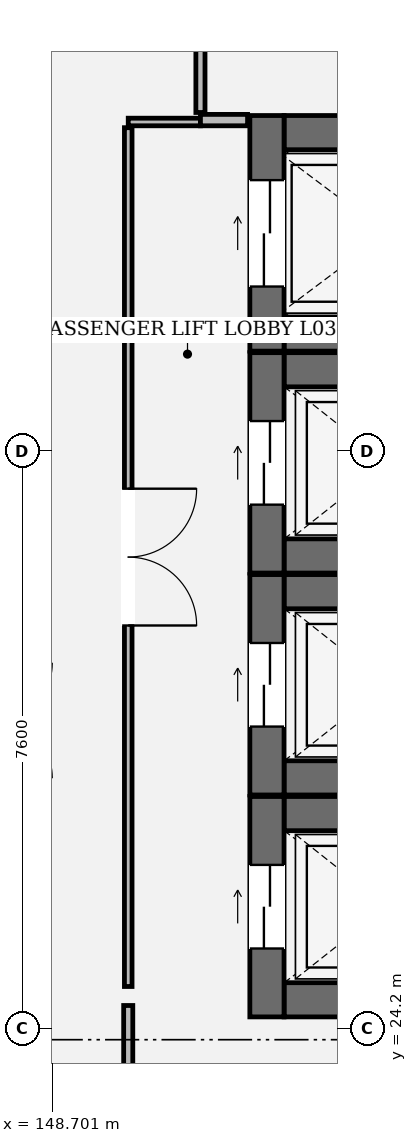
"""IFC4 building model, lengths in metres.
Left out: names, types, materials, properties, quantities, classifications, styles, units other than length and angle.
Written with IfcOpenShell. Run it as: python <this file> out.ifc"""

import sys

from ifc_helpers import new_model, si_unit, direction, frame, frame_2d, origin, place, context, subcontext, project, spatial, rectangle, extrude, element, fill, save


model = new_model("IFC4")
c1 = context("Model", 3, precision=1e-05, world=origin(), true_north=direction((0.0, 1.0)))
c2 = subcontext(c1, "Body", "Model", "MODEL_VIEW")
j1 = project(units=[si_unit("LENGTHUNIT", "METRE"), si_unit("PLANEANGLEUNIT", "RADIAN")], contexts=[c1])
p1 = place(None, origin())
s1 = spatial("IfcSite", under=j1, at=p1, CompositionType="ELEMENT")
p2 = place(p1, origin())
s2 = spatial("IfcBuilding", under=s1, at=p2, CompositionType="ELEMENT")
p3 = place(p2, frame((0.0, 0.0, 15.0)))
s3 = spatial("IfcBuildingStorey", under=s2, at=p3, CompositionType="ELEMENT", Elevation=15.0)
for number, where, z_axis, x_axis in (
    (1, (151.75, 24.575, 0.0), (0.0, 0.0, 1.0), (1.0, 0.0, 0.0)),
    (2, (151.75, 27.025, 0.0), (0.0, 0.0, 1.0), (1.0, 0.0, 0.0)),
):
    element("IfcWall", number, at=place(p3, frame(where, z_axis=z_axis, x_axis=x_axis)), inside=s3, PredefinedType="SHEAR", context=c2, shape_type="SweptSolid", body=[
        extrude(rectangle(XDim=2.7, YDim=0.45, at=frame_2d((1.35, 0.0))), origin(), (0.0, 0.0, 1.0), 4.48),
    ])
p4 = place(p3, frame((151.525, 24.35, 0.0), z_axis=(0.0, 0.0, 1.0), x_axis=(0.0, 1.0, 0.0)))
e3 = element("IfcWall", 3, at=p4, inside=s3, PredefinedType="SHEAR", context=c2, shape_type="SweptSolid", body=[
    extrude(rectangle(XDim=2.9, YDim=0.45, at=frame_2d((1.45, 0.0))), origin(), (0.0, 0.0, 1.0), 4.48),
])
p5 = place(p4, frame((0.9, 0.0, 0.0)))
e4 = element("IfcOpeningElement", 4, at=p5, cuts=e3, PredefinedType="OPENING", context=c2, shape_type="SweptSolid", body=[
    extrude(rectangle(XDim=1.1, YDim=2.2, at=frame_2d((0.55, 1.1))), frame((0.0, 0.237, 0.0), z_axis=(0.0, -1.0, 0.0), x_axis=(1.0, 0.0, 0.0)), (0.0, 0.0, 1.0), 0.474),
])
for number, where, z_axis, x_axis in (
    (5, (151.75, 27.495, 0.0), (0.0, 0.0, 1.0), (1.0, 0.0, 0.0)),
    (6, (151.75, 29.945, 0.0), (0.0, 0.0, 1.0), (1.0, 0.0, 0.0)),
):
    element("IfcWall", number, at=place(p3, frame(where, z_axis=z_axis, x_axis=x_axis)), inside=s3, PredefinedType="SHEAR", context=c2, shape_type="SweptSolid", body=[
        extrude(rectangle(XDim=2.7, YDim=0.45, at=frame_2d((1.35, 0.0))), origin(), (0.0, 0.0, 1.0), 4.48),
    ])
p6 = place(p3, frame((151.525, 27.27, 0.0), z_axis=(0.0, 0.0, 1.0), x_axis=(0.0, 1.0, 0.0)))
e7 = element("IfcWall", 7, at=p6, inside=s3, PredefinedType="SHEAR", context=c2, shape_type="SweptSolid", body=[
    extrude(rectangle(XDim=2.9, YDim=0.45, at=frame_2d((1.45, 0.0))), origin(), (0.0, 0.0, 1.0), 4.48),
])
p7 = place(p6, frame((0.9, 0.0, 0.0)))
e8 = element("IfcOpeningElement", 8, at=p7, cuts=e7, PredefinedType="OPENING", context=c2, shape_type="SweptSolid", body=[
    extrude(rectangle(XDim=1.1, YDim=2.2, at=frame_2d((0.55, 1.1))), frame((0.0, 0.237, 0.0), z_axis=(0.0, -1.0, 0.0), x_axis=(1.0, 0.0, 0.0)), (0.0, 0.0, 1.0), 0.474),
])
for number, where, z_axis, x_axis in (
    (9, (151.75, 30.415, 0.0), (0.0, 0.0, 1.0), (1.0, 0.0, 0.0)),
    (10, (151.75, 32.865, 0.0), (0.0, 0.0, 1.0), (1.0, 0.0, 0.0)),
):
    element("IfcWall", number, at=place(p3, frame(where, z_axis=z_axis, x_axis=x_axis)), inside=s3, PredefinedType="SHEAR", context=c2, shape_type="SweptSolid", body=[
        extrude(rectangle(XDim=2.7, YDim=0.45, at=frame_2d((1.35, 0.0))), origin(), (0.0, 0.0, 1.0), 4.48),
    ])
p8 = place(p3, frame((151.525, 30.19, 0.0), z_axis=(0.0, 0.0, 1.0), x_axis=(0.0, 1.0, 0.0)))
e11 = element("IfcWall", 11, at=p8, inside=s3, PredefinedType="SHEAR", context=c2, shape_type="SweptSolid", body=[
    extrude(rectangle(XDim=2.9, YDim=0.45, at=frame_2d((1.45, 0.0))), origin(), (0.0, 0.0, 1.0), 4.48),
])
p9 = place(p8, frame((0.9, 0.0, 0.0)))
e12 = element("IfcOpeningElement", 12, at=p9, cuts=e11, PredefinedType="OPENING", context=c2, shape_type="SweptSolid", body=[
    extrude(rectangle(XDim=1.1, YDim=2.2, at=frame_2d((0.55, 1.1))), frame((0.0, 0.237, 0.0), z_axis=(0.0, -1.0, 0.0), x_axis=(1.0, 0.0, 0.0)), (0.0, 0.0, 1.0), 0.474),
])
for number, where, z_axis, x_axis in (
    (13, (151.75, 33.335, 0.0), (0.0, 0.0, 1.0), (1.0, 0.0, 0.0)),
    (14, (151.75, 35.985, 0.0), (0.0, 0.0, 1.0), (1.0, 0.0, 0.0)),
):
    element("IfcWall", number, at=place(p3, frame(where, z_axis=z_axis, x_axis=x_axis)), inside=s3, PredefinedType="SHEAR", context=c2, shape_type="SweptSolid", body=[
        extrude(rectangle(XDim=2.7, YDim=0.45, at=frame_2d((1.35, 0.0))), origin(), (0.0, 0.0, 1.0), 4.48),
    ])
p10 = place(p3, frame((151.525, 33.11, 0.0), z_axis=(0.0, 0.0, 1.0), x_axis=(0.0, 1.0, 0.0)))
e15 = element("IfcWall", 15, at=p10, inside=s3, PredefinedType="SHEAR", context=c2, shape_type="SweptSolid", body=[
    extrude(rectangle(XDim=3.1, YDim=0.45, at=frame_2d((1.55, 0.0))), origin(), (0.0, 0.0, 1.0), 4.48),
])
p11 = place(p10, frame((0.85, 0.0, 0.0)))
e16 = element("IfcOpeningElement", 16, at=p11, cuts=e15, PredefinedType="OPENING", context=c2, shape_type="SweptSolid", body=[
    extrude(rectangle(XDim=1.4, YDim=2.3, at=frame_2d((0.7, 1.15))), frame((0.0, 0.237, 0.0), z_axis=(0.0, -1.0, 0.0), x_axis=(1.0, 0.0, 0.0)), (0.0, 0.0, 1.0), 0.474),
])
p12 = place(p3, frame((149.7, 24.75, 0.0), z_axis=(0.0, 0.0, 1.0), x_axis=(0.0, 1.0, 0.0)))
e17 = element("IfcWall", 17, at=p12, inside=s3, PredefinedType="PARTITIONING", context=c2, shape_type="SweptSolid", body=[
    extrude(rectangle(XDim=11.3, YDim=0.1, at=frame_2d((5.65, 0.0))), origin(), (0.0, 0.0, 1.0), 4.405),
])
p13 = place(p12, frame((4.75, 0.0, 0.0)))
e18 = element("IfcOpeningElement", 18, at=p13, cuts=e17, PredefinedType="OPENING", context=c2, shape_type="SweptSolid", body=[
    extrude(rectangle(XDim=1.8, YDim=2.4, at=frame_2d((0.9, 1.2))), frame((0.0, 0.062, 0.0), z_axis=(0.0, -1.0, 0.0), x_axis=(1.0, 0.0, 0.0)), (0.0, 0.0, 1.0), 0.124),
])
p14 = place(p3, frame((149.7, 36.125, 0.0), z_axis=(0.0, 0.0, 1.0), x_axis=(1.0, 0.0, 0.0)))
e19 = element("IfcWall", 19, at=p14, inside=s3, PredefinedType="PARTITIONING", context=c2, shape_type="SweptSolid", body=[
    extrude(rectangle(XDim=0.95, YDim=0.1, at=frame_2d((0.475, 0.0))), origin(), (0.0, 0.0, 1.0), 4.405),
])
p15 = place(p3, frame((150.65, 36.15, 0.0), z_axis=(0.0, 0.0, 1.0), x_axis=(1.0, 0.0, 0.0)))
e20 = element("IfcWall", 20, at=p15, inside=s3, PredefinedType="PARTITIONING", context=c2, shape_type="SweptSolid", body=[
    extrude(rectangle(XDim=0.62, YDim=0.15, at=frame_2d((0.31, 0.0))), origin(), (0.0, 0.0, 1.0), 4.405),
])
p16 = place(p3, frame((149.7, 24.5, 0.0), z_axis=(0.0, 0.0, 1.0), x_axis=(0.0, -1.0, 0.0)))
e21 = element("IfcWall", 21, at=p16, inside=s3, PredefinedType="PARTITIONING", context=c2, shape_type="SweptSolid", body=[
    extrude(rectangle(XDim=0.8, YDim=0.12, at=frame_2d((0.4, 0.0))), origin(), (0.0, 0.0, 1.0), 4.405),
])
p17 = place(p3, frame((150.65, 66.5, 0.0), z_axis=(0.0, 0.0, 1.0), x_axis=(0.0, -1.0, 0.0)))
e22 = element("IfcWall", 22, at=p17, inside=s3, PredefinedType="PARTITIONING", context=c2, shape_type="SweptSolid", body=[
    extrude(rectangle(XDim=30.25, YDim=0.12, at=frame_2d((15.125, 0.0))), origin(), (0.0, 0.0, 1.0), 4.405),
])
p18 = place(p17, frame((14.6, 0.0, 0.0)))
e23 = element("IfcOpeningElement", 23, at=p18, cuts=e22, PredefinedType="OPENING", context=c2, shape_type="SweptSolid", body=[
    extrude(rectangle(XDim=1.05, YDim=2.2, at=frame_2d((0.525, 1.1))), frame((0.0, 0.072, 0.0), z_axis=(0.0, -1.0, 0.0), x_axis=(1.0, 0.0, 0.0)), (0.0, 0.0, 1.0), 0.144),
])
p19 = place(p5, origin())
e24 = element("IfcDoor", 24, at=p19, inside=s3, OperationType="DOUBLE_DOOR_SLIDING", PredefinedType="DOOR", context=c2, shape_type="SweptSolid", body=[
    extrude(rectangle(XDim=1.1, YDim=2.2, at=frame_2d((0.55, 1.1))), frame((0.0, 0.025, 0.0), z_axis=(0.0, -1.0, 0.0), x_axis=(1.0, 0.0, 0.0)), (0.0, 0.0, 1.0), 0.05),
])
fill(e4, e24)
p20 = place(p7, origin())
e25 = element("IfcDoor", 25, at=p20, inside=s3, OperationType="DOUBLE_DOOR_SLIDING", PredefinedType="DOOR", context=c2, shape_type="SweptSolid", body=[
    extrude(rectangle(XDim=1.1, YDim=2.2, at=frame_2d((0.55, 1.1))), frame((0.0, 0.025, 0.0), z_axis=(0.0, -1.0, 0.0), x_axis=(1.0, 0.0, 0.0)), (0.0, 0.0, 1.0), 0.05),
])
fill(e8, e25)
p21 = place(p9, origin())
e26 = element("IfcDoor", 26, at=p21, inside=s3, OperationType="DOUBLE_DOOR_SLIDING", PredefinedType="DOOR", context=c2, shape_type="SweptSolid", body=[
    extrude(rectangle(XDim=1.1, YDim=2.2, at=frame_2d((0.55, 1.1))), frame((0.0, 0.025, 0.0), z_axis=(0.0, -1.0, 0.0), x_axis=(1.0, 0.0, 0.0)), (0.0, 0.0, 1.0), 0.05),
])
fill(e12, e26)
p22 = place(p11, origin())
e27 = element("IfcDoor", 27, at=p22, inside=s3, OperationType="DOUBLE_DOOR_SLIDING", PredefinedType="DOOR", context=c2, shape_type="SweptSolid", body=[
    extrude(rectangle(XDim=1.4, YDim=2.3, at=frame_2d((0.7, 1.15))), frame((0.0, 0.025, 0.0), z_axis=(0.0, -1.0, 0.0), x_axis=(1.0, 0.0, 0.0)), (0.0, 0.0, 1.0), 0.05),
])
fill(e16, e27)
p23 = place(p13, frame((1.8, 0.0, 0.0), z_axis=(0.0, 0.0, 1.0), x_axis=(-1.0, 0.0, 0.0)))
e28 = element("IfcDoor", 28, at=p23, inside=s3, OperationType="DOUBLE_DOOR_SINGLE_SWING", PredefinedType="DOOR", context=c2, shape_type="SweptSolid", body=[
    extrude(rectangle(XDim=1.8, YDim=2.4, at=frame_2d((0.9, 1.2))), frame((0.0, 0.025, 0.0), z_axis=(0.0, -1.0, 0.0), x_axis=(1.0, 0.0, 0.0)), (0.0, 0.0, 1.0), 0.05),
])
fill(e18, e28)
save(model, sys.argv[1])
